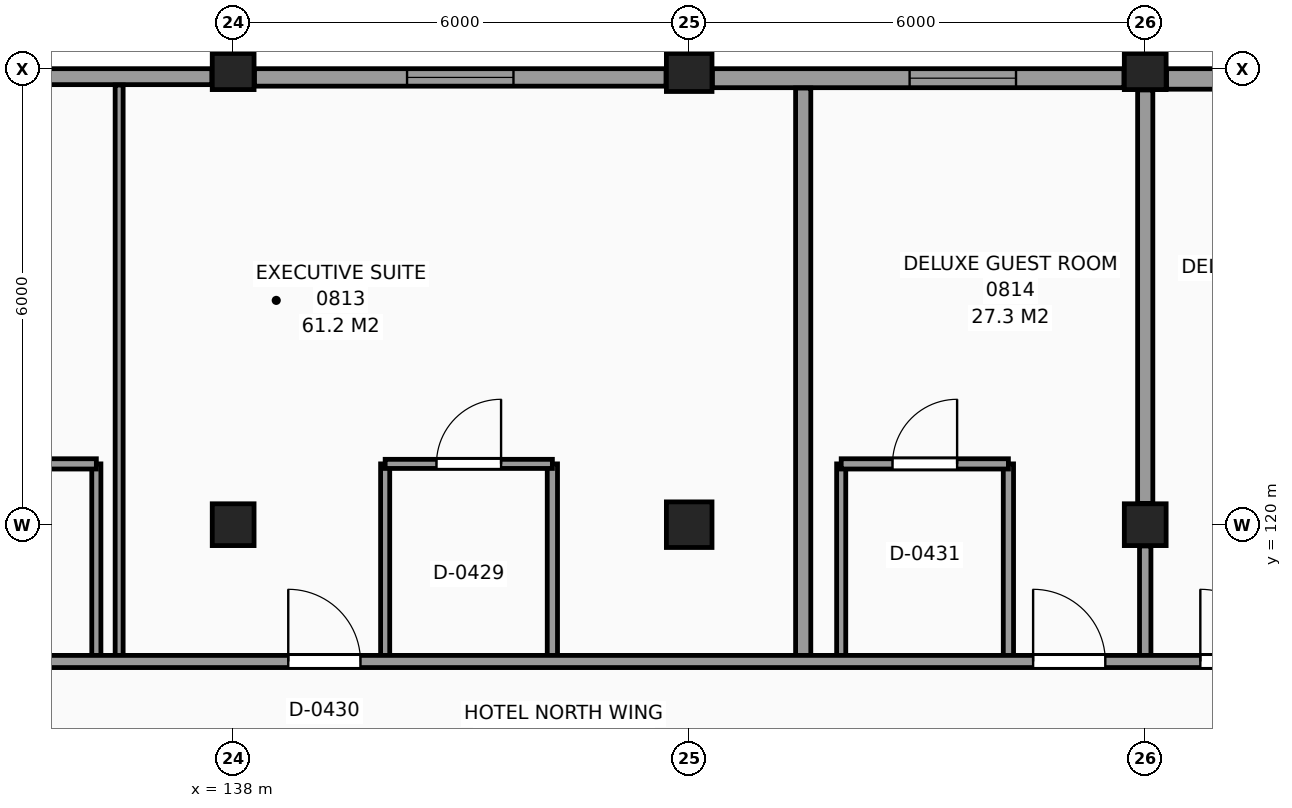
"""IFC4 building model, lengths in metres.
Left out: names, types, materials, properties, quantities, classifications, styles, units other than length and angle.
Written with IfcOpenShell. Run it as: python <this file> out.ifc"""

import sys

from ifc_helpers import new_model, si_unit, direction, frame, frame_2d, origin, origin_2d, place, context, subcontext, project, spatial, rectangle, extrude, element, fill, save


model = new_model("IFC4")
c1 = context("Model", 3, precision=1e-05, world=origin(), true_north=direction((0.0, 1.0)))
c2 = subcontext(c1, "Body", "Model", "MODEL_VIEW")
j1 = project(units=[si_unit("LENGTHUNIT", "METRE"), si_unit("PLANEANGLEUNIT", "RADIAN")], contexts=[c1])
p1 = place(None, origin())
s1 = spatial("IfcSite", under=j1, at=p1, CompositionType="ELEMENT")
p2 = place(p1, origin())
s2 = spatial("IfcBuilding", under=s1, at=p2, CompositionType="ELEMENT")
p3 = place(p2, frame((0.0, 0.0, 34.8)))
s3 = spatial("IfcBuildingStorey", under=s2, at=p3, CompositionType="ELEMENT", Elevation=34.8)
for number, where, z_axis, x_axis in (
    (1, (138.0, 120.0, 0.0), (0.0, 0.0, 1.0), (1.0, 0.0, 0.0)),
    (2, (138.0, 126.0, 0.0), (0.0, 0.0, 1.0), (1.0, 0.0, 0.0)),
):
    element("IfcColumn", number, at=place(p3, frame(where, z_axis=z_axis, x_axis=x_axis)), inside=s3, PredefinedType="COLUMN", context=c2, shape_type="SweptSolid", body=[
        extrude(rectangle(XDim=0.55, YDim=0.55, at=origin_2d()), origin(), (0.0, 0.0, 1.0), 3.3),
    ])
for number, where, z_axis, x_axis in (
    (3, (144.0, 120.0, 0.0), (0.0, 0.0, 1.0), (1.0, 0.0, 0.0)),
    (4, (144.0, 126.0, 0.0), (0.0, 0.0, 1.0), (1.0, 0.0, 0.0)),
):
    element("IfcColumn", number, at=place(p3, frame(where, z_axis=z_axis, x_axis=x_axis)), inside=s3, PredefinedType="COLUMN", context=c2, shape_type="SweptSolid", body=[
        extrude(rectangle(XDim=0.6, YDim=0.6, at=origin_2d()), origin(), (0.0, 0.0, 1.0), 3.3),
    ])
for number, where, z_axis, x_axis in (
    (5, (150.0, 120.0, 0.0), (0.0, 0.0, 1.0), (1.0, 0.0, 0.0)),
    (6, (150.0, 126.0, 0.0), (0.0, 0.0, 1.0), (1.0, 0.0, 0.0)),
):
    element("IfcColumn", number, at=place(p3, frame(where, z_axis=z_axis, x_axis=x_axis)), inside=s3, PredefinedType="COLUMN", context=c2, shape_type="SweptSolid", body=[
        extrude(rectangle(XDim=0.55, YDim=0.55, at=origin_2d()), origin(), (0.0, 0.0, 1.0), 3.3),
    ])
p4 = place(p3, frame((155.695, 125.865, 0.0), z_axis=(0.0, 0.0, 1.0), x_axis=(-1.0, 0.0, 0.0)))
e7 = element("IfcWall", 7, at=p4, inside=s3, PredefinedType="SOLIDWALL", context=c2, shape_type="SweptSolid", body=[
    extrude(rectangle(XDim=5.415, YDim=0.27, at=frame_2d((2.708, 0.0))), origin(), (0.0, 0.0, 1.0), 2.42),
])
p5 = place(p4, frame((2.595, 0.0, 0.8)))
e8 = element("IfcOpeningElement", 8, at=p5, cuts=e7, PredefinedType="OPENING", context=c2, shape_type="SweptSolid", body=[
    extrude(rectangle(XDim=1.4, YDim=1.4, at=frame_2d((0.7, 0.7))), frame((0.0, 0.145, 0.0), z_axis=(0.0, -1.0, 0.0), x_axis=(1.0, 0.0, 0.0)), (0.0, 0.0, 1.0), 0.29),
])
p6 = place(p3, frame((149.72, 125.875, 0.0), z_axis=(0.0, 0.0, 1.0), x_axis=(-1.0, 0.0, 0.0)))
e9 = element("IfcWall", 9, at=p6, inside=s3, PredefinedType="SOLIDWALL", context=c2, shape_type="SweptSolid", body=[
    extrude(rectangle(XDim=5.415, YDim=0.25, at=frame_2d((2.708, 0.0))), origin(), (0.0, 0.0, 1.0), 2.42),
])
p7 = place(p6, frame((1.42, 0.0, 0.8)))
e10 = element("IfcOpeningElement", 10, at=p7, cuts=e9, PredefinedType="OPENING", context=c2, shape_type="SweptSolid", body=[
    extrude(rectangle(XDim=1.4, YDim=1.4, at=frame_2d((0.7, 0.7))), frame((0.0, 0.135, 0.0), z_axis=(0.0, -1.0, 0.0), x_axis=(1.0, 0.0, 0.0)), (0.0, 0.0, 1.0), 0.27),
])
p8 = place(p3, frame((143.695, 125.885, 0.0), z_axis=(0.0, 0.0, 1.0), x_axis=(-1.0, 0.0, 0.0)))
e11 = element("IfcWall", 11, at=p8, inside=s3, PredefinedType="SOLIDWALL", context=c2, shape_type="SweptSolid", body=[
    extrude(rectangle(XDim=5.415, YDim=0.23, at=frame_2d((2.708, 0.0))), origin(), (0.0, 0.0, 1.0), 2.42),
])
p9 = place(p8, frame((2.007, 0.0, 0.8)))
e12 = element("IfcOpeningElement", 12, at=p9, cuts=e11, PredefinedType="OPENING", context=c2, shape_type="SweptSolid", body=[
    extrude(rectangle(XDim=1.4, YDim=1.4, at=frame_2d((0.7, 0.7))), frame((0.0, 0.125, 0.0), z_axis=(0.0, -1.0, 0.0), x_axis=(1.0, 0.0, 0.0)), (0.0, 0.0, 1.0), 0.25),
])
p10 = place(p3, frame((137.72, 125.895, 0.0), z_axis=(0.0, 0.0, 1.0), x_axis=(-1.0, 0.0, 0.0)))
e13 = element("IfcWall", 13, at=p10, inside=s3, PredefinedType="SOLIDWALL", context=c2, shape_type="SweptSolid", body=[
    extrude(rectangle(XDim=5.415, YDim=0.21, at=frame_2d((2.708, 0.0))), origin(), (0.0, 0.0, 1.0), 2.42),
])
p11 = place(p10, frame((2.607, 0.0, 0.8)))
e14 = element("IfcOpeningElement", 14, at=p11, cuts=e13, PredefinedType="OPENING", context=c2, shape_type="SweptSolid", body=[
    extrude(rectangle(XDim=1.4, YDim=1.4, at=frame_2d((0.7, 0.7))), frame((0.0, 0.115, 0.0), z_axis=(0.0, -1.0, 0.0), x_axis=(1.0, 0.0, 0.0)), (0.0, 0.0, 1.0), 0.23),
])
p12 = place(p3, frame((136.2, 118.2, 0.0), z_axis=(0.0, 0.0, 1.0), x_axis=(0.0, 1.0, 0.0)))
e15 = element("IfcWall", 15, at=p12, inside=s3, PredefinedType="PARTITIONING", context=c2, shape_type="SweptSolid", body=[
    extrude(rectangle(XDim=2.6, YDim=0.12, at=frame_2d((1.3, 0.0))), origin(), (0.0, 0.0, 1.0), 3.07),
])
p13 = place(p3, frame((136.5, 118.2, 0.0), z_axis=(0.0, 0.0, 1.0), x_axis=(0.0, 1.0, 0.0)))
e16 = element("IfcWall", 16, at=p13, inside=s3, PredefinedType="PARTITIONING", context=c2, shape_type="SweptSolid", body=[
    extrude(rectangle(XDim=7.585, YDim=0.105, at=frame_2d((3.792, 0.0))), origin(), (0.0, 0.0, 1.0), 3.07),
])
p14 = place(p3, frame((140.0, 118.2, 0.0), z_axis=(0.0, 0.0, 1.0), x_axis=(0.0, 1.0, 0.0)))
e17 = element("IfcWall", 17, at=p14, inside=s3, PredefinedType="PARTITIONING", context=c2, shape_type="SweptSolid", body=[
    extrude(rectangle(XDim=2.6, YDim=0.12, at=frame_2d((1.3, 0.0))), origin(), (0.0, 0.0, 1.0), 3.07),
])
p15 = place(p3, frame((142.2, 118.2, 0.0), z_axis=(0.0, 0.0, 1.0), x_axis=(0.0, 1.0, 0.0)))
e18 = element("IfcWall", 18, at=p15, inside=s3, PredefinedType="PARTITIONING", context=c2, shape_type="SweptSolid", body=[
    extrude(rectangle(XDim=2.6, YDim=0.135, at=frame_2d((1.3, 0.0))), origin(), (0.0, 0.0, 1.0), 3.07),
])
p16 = place(p3, frame((145.5, 118.2, 0.0), z_axis=(0.0, 0.0, 1.0), x_axis=(0.0, 1.0, 0.0)))
e19 = element("IfcWall", 19, at=p16, inside=s3, PredefinedType="PARTITIONING", context=c2, shape_type="SweptSolid", body=[
    extrude(rectangle(XDim=7.545, YDim=0.2, at=frame_2d((3.772, 0.0))), origin(), (0.0, 0.0, 1.0), 3.07),
])
p17 = place(p3, frame((146.0, 118.2, 0.0), z_axis=(0.0, 0.0, 1.0), x_axis=(0.0, 1.0, 0.0)))
e20 = element("IfcWall", 20, at=p17, inside=s3, PredefinedType="PARTITIONING", context=c2, shape_type="SweptSolid", body=[
    extrude(rectangle(XDim=2.6, YDim=0.12, at=frame_2d((1.3, 0.0))), origin(), (0.0, 0.0, 1.0), 3.07),
])
p18 = place(p3, frame((148.2, 118.2, 0.0), z_axis=(0.0, 0.0, 1.0), x_axis=(0.0, 1.0, 0.0)))
e21 = element("IfcWall", 21, at=p18, inside=s3, PredefinedType="PARTITIONING", context=c2, shape_type="SweptSolid", body=[
    extrude(rectangle(XDim=2.6, YDim=0.135, at=frame_2d((1.3, 0.0))), origin(), (0.0, 0.0, 1.0), 3.07),
])
p19 = place(p3, frame((150.0, 118.2, 0.0), z_axis=(0.0, 0.0, 1.0), x_axis=(0.0, 1.0, 0.0)))
e22 = element("IfcWall", 22, at=p19, inside=s3, PredefinedType="PARTITIONING", context=c2, shape_type="SweptSolid", body=[
    extrude(rectangle(XDim=1.52, YDim=0.15, at=frame_2d((0.76, 0.0))), origin(), (0.0, 0.0, 1.0), 2.57),
])
p20 = place(p3, frame((150.0, 120.28, 0.0), z_axis=(0.0, 0.0, 1.0), x_axis=(0.0, 1.0, 0.0)))
e23 = element("IfcWall", 23, at=p20, inside=s3, PredefinedType="PARTITIONING", context=c2, shape_type="SweptSolid", body=[
    extrude(rectangle(XDim=5.44, YDim=0.2, at=frame_2d((2.72, 0.0))), origin(), (0.0, 0.0, 1.0), 2.73),
])
p21 = place(p3, frame((66.275, 118.2, 0.0), z_axis=(0.0, 0.0, 1.0), x_axis=(1.0, 0.0, 0.0)))
e24 = element("IfcWall", 24, at=p21, inside=s3, PredefinedType="PARTITIONING", context=c2, shape_type="SweptSolid", body=[
    extrude(rectangle(XDim=110.225, YDim=0.16, at=frame_2d((55.113, 0.0))), origin(), (0.0, 0.0, 1.0), 3.07),
])
p22 = place(p21, frame((0.45, 0.0, 0.0)))
e25 = element("IfcOpeningElement", 25, at=p22, cuts=e24, PredefinedType="OPENING", context=c2, shape_type="SweptSolid", body=[
    extrude(rectangle(XDim=0.95, YDim=2.1, at=frame_2d((0.475, 1.05))), frame((0.0, 0.09, 0.0), z_axis=(0.0, -1.0, 0.0), x_axis=(1.0, 0.0, 0.0)), (0.0, 0.0, 1.0), 0.18),
])
p23 = place(p21, frame((4.85, 0.0, 0.0)))
e26 = element("IfcOpeningElement", 26, at=p23, cuts=e24, PredefinedType="OPENING", context=c2, shape_type="SweptSolid", body=[
    extrude(rectangle(XDim=0.95, YDim=2.1, at=frame_2d((0.475, 1.05))), frame((0.0, 0.09, 0.0), z_axis=(0.0, -1.0, 0.0), x_axis=(1.0, 0.0, 0.0)), (0.0, 0.0, 1.0), 0.18),
])
p24 = place(p21, frame((9.35, 0.0, 0.0)))
e27 = element("IfcOpeningElement", 27, at=p24, cuts=e24, PredefinedType="OPENING", context=c2, shape_type="SweptSolid", body=[
    extrude(rectangle(XDim=0.95, YDim=2.1, at=frame_2d((0.475, 1.05))), frame((0.0, 0.09, 0.0), z_axis=(0.0, -1.0, 0.0), x_axis=(1.0, 0.0, 0.0)), (0.0, 0.0, 1.0), 0.18),
])
p25 = place(p21, frame((18.45, 0.0, 0.0)))
e28 = element("IfcOpeningElement", 28, at=p25, cuts=e24, PredefinedType="OPENING", context=c2, shape_type="SweptSolid", body=[
    extrude(rectangle(XDim=0.95, YDim=2.1, at=frame_2d((0.475, 1.05))), frame((0.0, 0.09, 0.0), z_axis=(0.0, -1.0, 0.0), x_axis=(1.0, 0.0, 0.0)), (0.0, 0.0, 1.0), 0.18),
])
p26 = place(p21, frame((22.85, 0.0, 0.0)))
e29 = element("IfcOpeningElement", 29, at=p26, cuts=e24, PredefinedType="OPENING", context=c2, shape_type="SweptSolid", body=[
    extrude(rectangle(XDim=0.95, YDim=2.1, at=frame_2d((0.475, 1.05))), frame((0.0, 0.09, 0.0), z_axis=(0.0, -1.0, 0.0), x_axis=(1.0, 0.0, 0.0)), (0.0, 0.0, 1.0), 0.18),
])
p27 = place(p21, frame((27.35, 0.0, 0.0)))
e30 = element("IfcOpeningElement", 30, at=p27, cuts=e24, PredefinedType="OPENING", context=c2, shape_type="SweptSolid", body=[
    extrude(rectangle(XDim=0.95, YDim=2.1, at=frame_2d((0.475, 1.05))), frame((0.0, 0.09, 0.0), z_axis=(0.0, -1.0, 0.0), x_axis=(1.0, 0.0, 0.0)), (0.0, 0.0, 1.0), 0.18),
])
p28 = place(p21, frame((42.05, 0.0, 0.0)))
e31 = element("IfcOpeningElement", 31, at=p28, cuts=e24, PredefinedType="OPENING", context=c2, shape_type="SweptSolid", body=[
    extrude(rectangle(XDim=0.95, YDim=2.1, at=frame_2d((0.475, 1.05))), frame((0.0, 0.09, 0.0), z_axis=(0.0, -1.0, 0.0), x_axis=(1.0, 0.0, 0.0)), (0.0, 0.0, 1.0), 0.18),
])
p29 = place(p21, frame((50.3, 0.0, 0.0)))
e32 = element("IfcOpeningElement", 32, at=p29, cuts=e24, PredefinedType="OPENING", context=c2, shape_type="SweptSolid", body=[
    extrude(rectangle(XDim=0.95, YDim=2.1, at=frame_2d((0.475, 1.05))), frame((0.0, 0.09, 0.0), z_axis=(0.0, -1.0, 0.0), x_axis=(1.0, 0.0, 0.0)), (0.0, 0.0, 1.0), 0.18),
])
p30 = place(p21, frame((52.85, 0.0, 0.0)))
e33 = element("IfcOpeningElement", 33, at=p30, cuts=e24, PredefinedType="OPENING", context=c2, shape_type="SweptSolid", body=[
    extrude(rectangle(XDim=0.95, YDim=2.1, at=frame_2d((0.475, 1.05))), frame((0.0, 0.09, 0.0), z_axis=(0.0, -1.0, 0.0), x_axis=(1.0, 0.0, 0.0)), (0.0, 0.0, 1.0), 0.18),
])
p31 = place(p21, frame((60.05, 0.0, 0.0)))
e34 = element("IfcOpeningElement", 34, at=p31, cuts=e24, PredefinedType="OPENING", context=c2, shape_type="SweptSolid", body=[
    extrude(rectangle(XDim=0.95, YDim=2.1, at=frame_2d((0.475, 1.05))), frame((0.0, 0.09, 0.0), z_axis=(0.0, -1.0, 0.0), x_axis=(1.0, 0.0, 0.0)), (0.0, 0.0, 1.0), 0.18),
])
p32 = place(p21, frame((64.25, 0.0, 0.0)))
e35 = element("IfcOpeningElement", 35, at=p32, cuts=e24, PredefinedType="OPENING", context=c2, shape_type="SweptSolid", body=[
    extrude(rectangle(XDim=0.95, YDim=2.1, at=frame_2d((0.475, 1.05))), frame((0.0, 0.09, 0.0), z_axis=(0.0, -1.0, 0.0), x_axis=(1.0, 0.0, 0.0)), (0.0, 0.0, 1.0), 0.18),
])
p33 = place(p21, frame((66.45, 0.0, 0.0)))
e36 = element("IfcOpeningElement", 36, at=p33, cuts=e24, PredefinedType="OPENING", context=c2, shape_type="SweptSolid", body=[
    extrude(rectangle(XDim=0.95, YDim=2.1, at=frame_2d((0.475, 1.05))), frame((0.0, 0.09, 0.0), z_axis=(0.0, -1.0, 0.0), x_axis=(1.0, 0.0, 0.0)), (0.0, 0.0, 1.0), 0.18),
])
p34 = place(p21, frame((72.45, 0.0, 0.0)))
e37 = element("IfcOpeningElement", 37, at=p34, cuts=e24, PredefinedType="OPENING", context=c2, shape_type="SweptSolid", body=[
    extrude(rectangle(XDim=0.95, YDim=2.1, at=frame_2d((0.475, 1.05))), frame((0.0, 0.09, 0.0), z_axis=(0.0, -1.0, 0.0), x_axis=(1.0, 0.0, 0.0)), (0.0, 0.0, 1.0), 0.18),
])
p35 = place(p21, frame((82.25, 0.0, 0.0)))
e38 = element("IfcOpeningElement", 38, at=p35, cuts=e24, PredefinedType="OPENING", context=c2, shape_type="SweptSolid", body=[
    extrude(rectangle(XDim=0.95, YDim=2.1, at=frame_2d((0.475, 1.05))), frame((0.0, 0.09, 0.0), z_axis=(0.0, -1.0, 0.0), x_axis=(1.0, 0.0, 0.0)), (0.0, 0.0, 1.0), 0.18),
])
p36 = place(p21, frame((84.45, 0.0, 0.0)))
e39 = element("IfcOpeningElement", 39, at=p36, cuts=e24, PredefinedType="OPENING", context=c2, shape_type="SweptSolid", body=[
    extrude(rectangle(XDim=0.95, YDim=2.1, at=frame_2d((0.475, 1.05))), frame((0.0, 0.09, 0.0), z_axis=(0.0, -1.0, 0.0), x_axis=(1.0, 0.0, 0.0)), (0.0, 0.0, 1.0), 0.18),
])
p37 = place(p21, frame((88.85, 0.0, 0.0)))
e40 = element("IfcOpeningElement", 40, at=p37, cuts=e24, PredefinedType="OPENING", context=c2, shape_type="SweptSolid", body=[
    extrude(rectangle(XDim=0.95, YDim=2.1, at=frame_2d((0.475, 1.05))), frame((0.0, 0.09, 0.0), z_axis=(0.0, -1.0, 0.0), x_axis=(1.0, 0.0, 0.0)), (0.0, 0.0, 1.0), 0.18),
])
p38 = place(p21, frame((96.05, 0.0, 0.0)))
e41 = element("IfcOpeningElement", 41, at=p38, cuts=e24, PredefinedType="OPENING", context=c2, shape_type="SweptSolid", body=[
    extrude(rectangle(XDim=0.95, YDim=2.1, at=frame_2d((0.475, 1.05))), frame((0.0, 0.09, 0.0), z_axis=(0.0, -1.0, 0.0), x_axis=(1.0, 0.0, 0.0)), (0.0, 0.0, 1.0), 0.18),
])
p39 = place(p21, frame((104.3, 0.0, 0.0)))
e42 = element("IfcOpeningElement", 42, at=p39, cuts=e24, PredefinedType="OPENING", context=c2, shape_type="SweptSolid", body=[
    extrude(rectangle(XDim=0.95, YDim=2.1, at=frame_2d((0.475, 1.05))), frame((0.0, 0.09, 0.0), z_axis=(0.0, -1.0, 0.0), x_axis=(1.0, 0.0, 0.0)), (0.0, 0.0, 1.0), 0.18),
])
p40 = place(p21, frame((108.45, 0.0, 0.0)))
e43 = element("IfcOpeningElement", 43, at=p40, cuts=e24, PredefinedType="OPENING", context=c2, shape_type="SweptSolid", body=[
    extrude(rectangle(XDim=0.95, YDim=2.1, at=frame_2d((0.475, 1.05))), frame((0.0, 0.09, 0.0), z_axis=(0.0, -1.0, 0.0), x_axis=(1.0, 0.0, 0.0)), (0.0, 0.0, 1.0), 0.18),
])
p41 = place(p3, frame((134.0, 120.8, 0.0), z_axis=(0.0, 0.0, 1.0), x_axis=(1.0, 0.0, 0.0)))
e44 = element("IfcWall", 44, at=p41, inside=s3, PredefinedType="PARTITIONING", context=c2, shape_type="SweptSolid", body=[
    extrude(rectangle(XDim=2.2, YDim=0.135, at=frame_2d((1.1, 0.0))), origin(), (0.0, 0.0, 1.0), 3.07),
])
p42 = place(p41, frame((0.675, 0.0, 0.0)))
e45 = element("IfcOpeningElement", 45, at=p42, cuts=e44, PredefinedType="OPENING", context=c2, shape_type="SweptSolid", body=[
    extrude(rectangle(XDim=0.85, YDim=2.1, at=frame_2d((0.425, 1.05))), frame((0.0, 0.078, 0.0), z_axis=(0.0, -1.0, 0.0), x_axis=(1.0, 0.0, 0.0)), (0.0, 0.0, 1.0), 0.155),
])
p43 = place(p3, frame((140.0, 120.8, 0.0), z_axis=(0.0, 0.0, 1.0), x_axis=(1.0, 0.0, 0.0)))
e46 = element("IfcWall", 46, at=p43, inside=s3, PredefinedType="PARTITIONING", context=c2, shape_type="SweptSolid", body=[
    extrude(rectangle(XDim=2.2, YDim=0.12, at=frame_2d((1.1, 0.0))), origin(), (0.0, 0.0, 1.0), 3.07),
])
p44 = place(p43, frame((0.675, 0.0, 0.0)))
e47 = element("IfcOpeningElement", 47, at=p44, cuts=e46, PredefinedType="OPENING", context=c2, shape_type="SweptSolid", body=[
    extrude(rectangle(XDim=0.85, YDim=2.1, at=frame_2d((0.425, 1.05))), frame((0.0, 0.07, 0.0), z_axis=(0.0, -1.0, 0.0), x_axis=(1.0, 0.0, 0.0)), (0.0, 0.0, 1.0), 0.14),
])
p45 = place(p3, frame((146.0, 120.8, 0.0), z_axis=(0.0, 0.0, 1.0), x_axis=(1.0, 0.0, 0.0)))
e48 = element("IfcWall", 48, at=p45, inside=s3, PredefinedType="PARTITIONING", context=c2, shape_type="SweptSolid", body=[
    extrude(rectangle(XDim=2.2, YDim=0.135, at=frame_2d((1.1, 0.0))), origin(), (0.0, 0.0, 1.0), 3.07),
])
p46 = place(p45, frame((0.675, 0.0, 0.0)))
e49 = element("IfcOpeningElement", 49, at=p46, cuts=e48, PredefinedType="OPENING", context=c2, shape_type="SweptSolid", body=[
    extrude(rectangle(XDim=0.85, YDim=2.1, at=frame_2d((0.425, 1.05))), frame((0.0, 0.078, 0.0), z_axis=(0.0, -1.0, 0.0), x_axis=(1.0, 0.0, 0.0)), (0.0, 0.0, 1.0), 0.155),
])
p47 = place(p9, origin())
e50 = element("IfcWindow", 50, at=p47, inside=s3, PartitioningType="SINGLE_PANEL", PredefinedType="WINDOW", context=c2, shape_type="SweptSolid", body=[
    extrude(rectangle(XDim=1.4, YDim=1.4, at=frame_2d((0.7, 0.7))), frame((0.0, 0.03, 0.0), z_axis=(0.0, -1.0, 0.0), x_axis=(1.0, 0.0, 0.0)), (0.0, 0.0, 1.0), 0.06),
])
fill(e12, e50)
p48 = place(p7, origin())
e51 = element("IfcWindow", 51, at=p48, inside=s3, PartitioningType="SINGLE_PANEL", PredefinedType="WINDOW", context=c2, shape_type="SweptSolid", body=[
    extrude(rectangle(XDim=1.4, YDim=1.4, at=frame_2d((0.7, 0.7))), frame((0.0, 0.03, 0.0), z_axis=(0.0, -1.0, 0.0), x_axis=(1.0, 0.0, 0.0)), (0.0, 0.0, 1.0), 0.06),
])
fill(e10, e51)
p49 = place(p44, origin())
e52 = element("IfcDoor", 52, at=p49, inside=s3, OperationType="SINGLE_SWING_RIGHT", PredefinedType="DOOR", context=c2, shape_type="SweptSolid", body=[
    extrude(rectangle(XDim=0.85, YDim=2.1, at=frame_2d((0.425, 1.05))), frame((0.0, 0.025, 0.0), z_axis=(0.0, -1.0, 0.0), x_axis=(1.0, 0.0, 0.0)), (0.0, 0.0, 1.0), 0.05),
])
fill(e47, e52)
p50 = place(p34, origin())
e53 = element("IfcDoor", 53, at=p50, inside=s3, OperationType="SINGLE_SWING_LEFT", PredefinedType="DOOR", context=c2, shape_type="SweptSolid", body=[
    extrude(rectangle(XDim=0.95, YDim=2.1, at=frame_2d((0.475, 1.05))), frame((0.0, 0.025, 0.0), z_axis=(0.0, -1.0, 0.0), x_axis=(1.0, 0.0, 0.0)), (0.0, 0.0, 1.0), 0.05),
])
fill(e37, e53)
p51 = place(p46, origin())
e54 = element("IfcDoor", 54, at=p51, inside=s3, OperationType="SINGLE_SWING_RIGHT", PredefinedType="DOOR", context=c2, shape_type="SweptSolid", body=[
    extrude(rectangle(XDim=0.85, YDim=2.1, at=frame_2d((0.425, 1.05))), frame((0.0, 0.025, 0.0), z_axis=(0.0, -1.0, 0.0), x_axis=(1.0, 0.0, 0.0)), (0.0, 0.0, 1.0), 0.05),
])
fill(e49, e54)
p52 = place(p35, origin())
e55 = element("IfcDoor", 55, at=p52, inside=s3, OperationType="SINGLE_SWING_LEFT", PredefinedType="DOOR", context=c2, shape_type="SweptSolid", body=[
    extrude(rectangle(XDim=0.95, YDim=2.1, at=frame_2d((0.475, 1.05))), frame((0.0, 0.025, 0.0), z_axis=(0.0, -1.0, 0.0), x_axis=(1.0, 0.0, 0.0)), (0.0, 0.0, 1.0), 0.05),
])
fill(e38, e55)
p53 = place(p36, origin())
e56 = element("IfcDoor", 56, at=p53, inside=s3, OperationType="SINGLE_SWING_LEFT", PredefinedType="DOOR", context=c2, shape_type="SweptSolid", body=[
    extrude(rectangle(XDim=0.95, YDim=2.1, at=frame_2d((0.475, 1.05))), frame((0.0, 0.025, 0.0), z_axis=(0.0, -1.0, 0.0), x_axis=(1.0, 0.0, 0.0)), (0.0, 0.0, 1.0), 0.05),
])
fill(e39, e56)
save(model, sys.argv[1])
